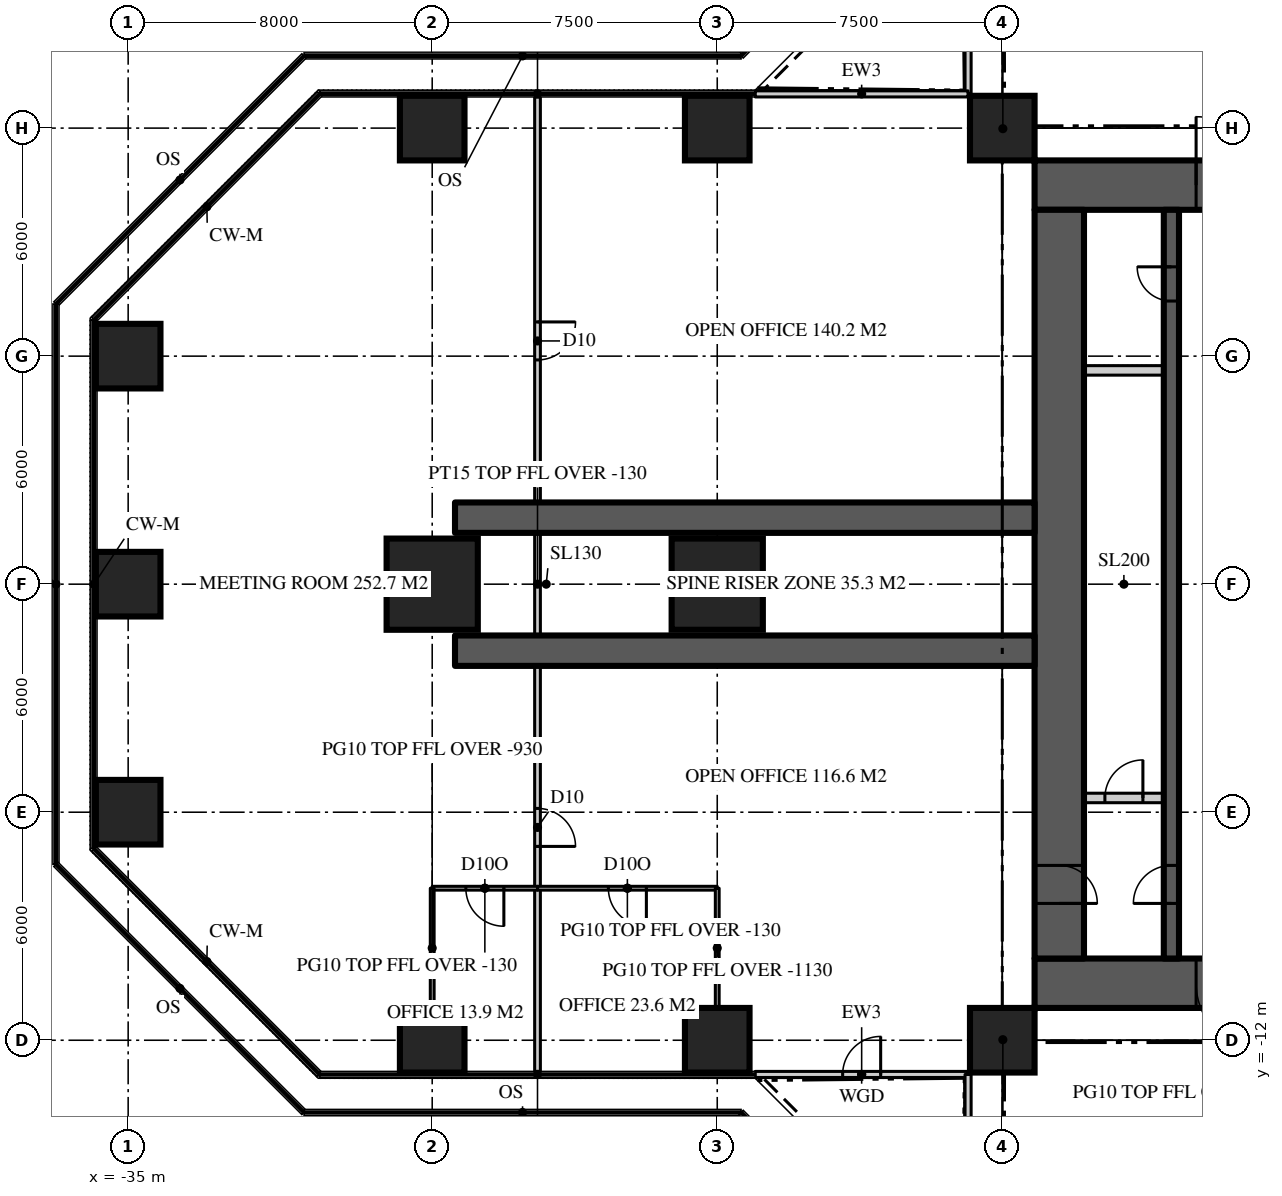
"""IFC4 building model, lengths in metres.
Left out: names, types, materials, properties, quantities, classifications, styles, units other than length and angle.
Written with IfcOpenShell. Run it as: python <this file> out.ifc"""

import sys

from ifc_helpers import new_model, si_unit, direction, frame, frame_2d, origin, origin_2d, place, context, subcontext, project, spatial, rectangle, extrude, element, fill, save


model = new_model("IFC4")
c1 = context("Model", 3, precision=1e-05, world=origin(), true_north=direction((0.0, 1.0)))
c2 = subcontext(c1, "Body", "Model", "MODEL_VIEW")
j1 = project(units=[si_unit("LENGTHUNIT", "METRE"), si_unit("PLANEANGLEUNIT", "RADIAN")], contexts=[c1])
p1 = place(None, origin())
s1 = spatial("IfcSite", under=j1, at=p1, CompositionType="ELEMENT")
p2 = place(p1, origin())
s2 = spatial("IfcBuilding", under=s1, at=p2, CompositionType="ELEMENT")
p3 = place(p2, frame((0.0, 0.0, 182.7)))
s3 = spatial("IfcBuildingStorey", under=s2, at=p3, CompositionType="ELEMENT", Elevation=182.7)
p4 = place(p3, frame((-11.15, 10.5, 0.0), z_axis=(0.0, 0.0, 1.0), x_axis=(1.0, 0.0, 0.0)))
e1 = element("IfcWall", 1, at=p4, inside=s3, PredefinedType="SHEAR", context=c2, shape_type="SweptSolid", body=[
    extrude(rectangle(XDim=22.3, YDim=1.3, at=frame_2d((11.15, 0.0))), origin(), (0.0, 0.0, 1.0), 3.9),
])
p5 = place(p4, frame((4.25, 0.0, 0.0)))
e2 = element("IfcOpeningElement", 2, at=p5, cuts=e1, PredefinedType="OPENING", context=c2, shape_type="SweptSolid", body=[
    extrude(rectangle(XDim=1.8, YDim=2.2, at=frame_2d((0.9, 1.1))), frame((0.0, 0.66, 0.0), z_axis=(0.0, -1.0, 0.0), x_axis=(1.0, 0.0, 0.0)), (0.0, 0.0, 1.0), 1.32),
])
p6 = place(p4, frame((16.25, 0.0, 0.0)))
e3 = element("IfcOpeningElement", 3, at=p6, cuts=e1, PredefinedType="OPENING", context=c2, shape_type="SweptSolid", body=[
    extrude(rectangle(XDim=1.8, YDim=2.2, at=frame_2d((0.9, 1.1))), frame((0.0, 0.66, 0.0), z_axis=(0.0, -1.0, 0.0), x_axis=(1.0, 0.0, 0.0)), (0.0, 0.0, 1.0), 1.32),
])
p7 = place(p3, frame((11.15, -10.5, 0.0), z_axis=(0.0, 0.0, 1.0), x_axis=(-1.0, 0.0, 0.0)))
e4 = element("IfcWall", 4, at=p7, inside=s3, PredefinedType="SHEAR", context=c2, shape_type="SweptSolid", body=[
    extrude(rectangle(XDim=22.3, YDim=1.3, at=frame_2d((11.15, 0.0))), origin(), (0.0, 0.0, 1.0), 3.9),
])
p8 = place(p7, frame((16.25, 0.0, 0.0)))
e5 = element("IfcOpeningElement", 5, at=p8, cuts=e4, PredefinedType="OPENING", context=c2, shape_type="SweptSolid", body=[
    extrude(rectangle(XDim=1.8, YDim=2.2, at=frame_2d((0.9, 1.1))), frame((0.0, 0.66, 0.0), z_axis=(0.0, -1.0, 0.0), x_axis=(1.0, 0.0, 0.0)), (0.0, 0.0, 1.0), 1.32),
])
p9 = place(p7, frame((4.25, 0.0, 0.0)))
e6 = element("IfcOpeningElement", 6, at=p9, cuts=e4, PredefinedType="OPENING", context=c2, shape_type="SweptSolid", body=[
    extrude(rectangle(XDim=1.8, YDim=2.2, at=frame_2d((0.9, 1.1))), frame((0.0, 0.66, 0.0), z_axis=(0.0, -1.0, 0.0), x_axis=(1.0, 0.0, 0.0)), (0.0, 0.0, 1.0), 1.32),
])
p10 = place(p3, frame((-10.5, 9.85, 0.0), z_axis=(0.0, 0.0, 1.0), x_axis=(0.0, -1.0, 0.0)))
e7 = element("IfcWall", 7, at=p10, inside=s3, PredefinedType="SHEAR", context=c2, shape_type="SweptSolid", body=[
    extrude(rectangle(XDim=19.7, YDim=1.3, at=frame_2d((9.85, 0.0))), origin(), (0.0, 0.0, 1.0), 3.9),
])
p11 = place(p10, frame((17.25, 0.0, 0.0)))
e8 = element("IfcOpeningElement", 8, at=p11, cuts=e7, PredefinedType="OPENING", context=c2, shape_type="SweptSolid", body=[
    extrude(rectangle(XDim=1.0, YDim=2.2, at=frame_2d((0.5, 1.1))), frame((0.0, 0.66, 0.0), z_axis=(0.0, -1.0, 0.0), x_axis=(1.0, 0.0, 0.0)), (0.0, 0.0, 1.0), 1.32),
])
for number, where, z_axis, x_axis in (
    (9, (-11.15, 1.75, 0.0), (0.0, 0.0, 1.0), (-1.0, 0.0, 0.0)),
    (10, (-11.15, -1.75, 0.0), (0.0, 0.0, 1.0), (-1.0, 0.0, 0.0)),
):
    element("IfcWall", number, at=place(p3, frame(where, z_axis=z_axis, x_axis=x_axis)), inside=s3, PredefinedType="SHEAR", context=c2, shape_type="SweptSolid", body=[
        extrude(rectangle(XDim=15.25, YDim=0.8, at=frame_2d((7.625, 0.0))), origin(), (0.0, 0.0, 1.0), 3.9),
    ])
for number, where, z_axis, x_axis in (
    (11, (-27.0, -12.0, 0.0), (0.0, 0.0, 1.0), (1.0, 0.0, 0.0)),
    (12, (-19.5, -12.0, 0.0), (0.0, 0.0, 1.0), (1.0, 0.0, 0.0)),
    (13, (-12.0, -12.0, 0.0), (0.0, 0.0, 1.0), (1.0, 0.0, 0.0)),
    (14, (-35.0, -6.0, 0.0), (0.0, 0.0, 1.0), (1.0, 0.0, 0.0)),
    (15, (-35.0, 0.0, 0.0), (0.0, 0.0, 1.0), (1.0, 0.0, 0.0)),
):
    element("IfcColumn", number, at=place(p3, frame(where, z_axis=z_axis, x_axis=x_axis)), inside=s3, PredefinedType="COLUMN", context=c2, shape_type="SweptSolid", body=[
        extrude(rectangle(XDim=1.7, YDim=1.7, at=origin_2d()), origin(), (0.0, 0.0, 1.0), 3.9),
    ])
for number, where, z_axis, x_axis in (
    (16, (-27.0, 0.0, 0.0), (0.0, 0.0, 1.0), (1.0, 0.0, 0.0)),
    (17, (-19.5, 0.0, 0.0), (0.0, 0.0, 1.0), (1.0, 0.0, 0.0)),
):
    element("IfcColumn", number, at=place(p3, frame(where, z_axis=z_axis, x_axis=x_axis)), inside=s3, PredefinedType="COLUMN", context=c2, shape_type="SweptSolid", body=[
        extrude(rectangle(XDim=2.4, YDim=2.4, at=origin_2d()), origin(), (0.0, 0.0, 1.0), 3.9),
    ])
for number, where, z_axis, x_axis in (
    (18, (-35.0, 6.0, 0.0), (0.0, 0.0, 1.0), (1.0, 0.0, 0.0)),
    (19, (-27.0, 12.0, 0.0), (0.0, 0.0, 1.0), (1.0, 0.0, 0.0)),
    (20, (-19.5, 12.0, 0.0), (0.0, 0.0, 1.0), (1.0, 0.0, 0.0)),
    (21, (-12.0, 12.0, 0.0), (0.0, 0.0, 1.0), (1.0, 0.0, 0.0)),
):
    element("IfcColumn", number, at=place(p3, frame(where, z_axis=z_axis, x_axis=x_axis)), inside=s3, PredefinedType="COLUMN", context=c2, shape_type="SweptSolid", body=[
        extrude(rectangle(XDim=1.7, YDim=1.7, at=origin_2d()), origin(), (0.0, 0.0, 1.0), 3.9),
    ])
p12 = place(p3, frame((-12.9, 18.5, 0.0), z_axis=(0.0, 0.0, 1.0), x_axis=(0.0, -1.0, 0.0)))
e22 = element("IfcWall", 22, at=p12, inside=s3, PredefinedType="SOLIDWALL", context=c2, shape_type="SweptSolid", body=[
    extrude(rectangle(XDim=5.6, YDim=0.16, at=frame_2d((2.8, 0.0))), origin(), (0.0, 0.0, 1.0), 3.77),
])
p13 = place(p12, frame((2.3, 0.0, 0.0)))
e23 = element("IfcOpeningElement", 23, at=p13, cuts=e22, PredefinedType="OPENING", context=c2, shape_type="SweptSolid", body=[
    extrude(rectangle(XDim=1.0, YDim=2.2, at=frame_2d((0.5, 1.1))), frame((0.0, 0.09, 0.0), z_axis=(0.0, -1.0, 0.0), x_axis=(1.0, 0.0, 0.0)), (0.0, 0.0, 1.0), 0.18),
])
p14 = place(p3, frame((-12.9, 12.9, 0.0), z_axis=(0.0, 0.0, 1.0), x_axis=(-1.0, 0.0, 0.0)))
e24 = element("IfcWall", 24, at=p14, inside=s3, PredefinedType="SOLIDWALL", context=c2, shape_type="SweptSolid", body=[
    extrude(rectangle(XDim=5.6, YDim=0.16, at=frame_2d((2.8, 0.0))), origin(), (0.0, 0.0, 1.0), 3.77),
])
p15 = place(p3, frame((-18.5, -12.9, 0.0), z_axis=(0.0, 0.0, 1.0), x_axis=(1.0, 0.0, 0.0)))
e25 = element("IfcWall", 25, at=p15, inside=s3, PredefinedType="SOLIDWALL", context=c2, shape_type="SweptSolid", body=[
    extrude(rectangle(XDim=5.6, YDim=0.16, at=frame_2d((2.8, 0.0))), origin(), (0.0, 0.0, 1.0), 3.77),
])
p16 = place(p15, frame((2.3, 0.0, 0.0)))
e26 = element("IfcOpeningElement", 26, at=p16, cuts=e25, PredefinedType="OPENING", context=c2, shape_type="SweptSolid", body=[
    extrude(rectangle(XDim=1.0, YDim=2.2, at=frame_2d((0.5, 1.1))), frame((0.0, 0.09, 0.0), z_axis=(0.0, -1.0, 0.0), x_axis=(1.0, 0.0, 0.0)), (0.0, 0.0, 1.0), 0.18),
])
p17 = place(p3, frame((-12.9, -12.9, 0.0), z_axis=(0.0, 0.0, 1.0), x_axis=(0.0, -1.0, 0.0)))
e27 = element("IfcWall", 27, at=p17, inside=s3, PredefinedType="SOLIDWALL", context=c2, shape_type="SweptSolid", body=[
    extrude(rectangle(XDim=5.6, YDim=0.16, at=frame_2d((2.8, 0.0))), origin(), (0.0, 0.0, 1.0), 3.77),
])
p18 = place(p3, frame((-7.55, -9.85, 0.0), z_axis=(0.0, 0.0, 1.0), x_axis=(0.0, 1.0, 0.0)))
e28 = element("IfcWall", 28, at=p18, inside=s3, PredefinedType="SHEAR", context=c2, shape_type="SweptSolid", body=[
    extrude(rectangle(XDim=19.7, YDim=0.4, at=frame_2d((9.85, 0.0))), origin(), (0.0, 0.0, 1.0), 3.9),
])
p19 = place(p18, frame((1.45, 0.0, 0.0)))
e29 = element("IfcOpeningElement", 29, at=p19, cuts=e28, PredefinedType="OPENING", context=c2, shape_type="SweptSolid", body=[
    extrude(rectangle(XDim=1.0, YDim=2.2, at=frame_2d((0.5, 1.1))), frame((0.0, 0.21, 0.0), z_axis=(0.0, -1.0, 0.0), x_axis=(1.0, 0.0, 0.0)), (0.0, 0.0, 1.0), 0.42),
])
p20 = place(p18, frame((17.3, 0.0, 0.0)))
e30 = element("IfcOpeningElement", 30, at=p20, cuts=e28, PredefinedType="OPENING", context=c2, shape_type="SweptSolid", body=[
    extrude(rectangle(XDim=0.9, YDim=2.1, at=frame_2d((0.45, 1.05))), frame((0.0, 0.21, 0.0), z_axis=(0.0, -1.0, 0.0), x_axis=(1.0, 0.0, 0.0)), (0.0, 0.0, 1.0), 0.42),
])
p21 = place(p3, frame((-9.85, 5.625, 0.0), z_axis=(0.0, 0.0, 1.0), x_axis=(1.0, 0.0, 0.0)))
e31 = element("IfcWall", 31, at=p21, inside=s3, PredefinedType="SOLIDWALL", context=c2, shape_type="SweptSolid", body=[
    extrude(rectangle(XDim=2.1, YDim=0.25, at=frame_2d((1.05, 0.0))), origin(), (0.0, 0.0, 1.0), 3.7),
])
p22 = place(p3, frame((-9.85, -5.625, 0.0), z_axis=(0.0, 0.0, 1.0), x_axis=(1.0, 0.0, 0.0)))
e32 = element("IfcWall", 32, at=p22, inside=s3, PredefinedType="SOLIDWALL", context=c2, shape_type="SweptSolid", body=[
    extrude(rectangle(XDim=2.1, YDim=0.25, at=frame_2d((1.05, 0.0))), origin(), (0.0, 0.0, 1.0), 3.7),
])
p23 = place(p22, frame((0.55, 0.0, 0.0)))
e33 = element("IfcOpeningElement", 33, at=p23, cuts=e32, PredefinedType="OPENING", context=c2, shape_type="SweptSolid", body=[
    extrude(rectangle(XDim=1.0, YDim=2.2, at=frame_2d((0.5, 1.1))), frame((0.0, 0.135, 0.0), z_axis=(0.0, -1.0, 0.0), x_axis=(1.0, 0.0, 0.0)), (0.0, 0.0, 1.0), 0.27),
])
p24 = place(p3, frame((-24.229, 12.82, 0.0), z_axis=(0.0, 0.0, 1.0), x_axis=(0.0, -1.0, 0.0)))
e34 = element("IfcWall", 34, at=p24, inside=s3, PredefinedType="PARTITIONING", context=c2, shape_type="SweptSolid", body=[
    extrude(rectangle(XDim=25.64, YDim=0.15, at=frame_2d((12.82, 0.0))), origin(), (0.0, 0.0, 1.0), 3.77),
])
p25 = place(p24, frame((18.72, 0.0, 0.0)))
e35 = element("IfcOpeningElement", 35, at=p25, cuts=e34, PredefinedType="OPENING", context=c2, shape_type="SweptSolid", body=[
    extrude(rectangle(XDim=1.0, YDim=2.2, at=frame_2d((0.5, 1.1))), frame((0.0, 0.085, 0.0), z_axis=(0.0, -1.0, 0.0), x_axis=(1.0, 0.0, 0.0)), (0.0, 0.0, 1.0), 0.17),
])
p26 = place(p24, frame((5.92, 0.0, 0.0)))
e36 = element("IfcOpeningElement", 36, at=p26, cuts=e34, PredefinedType="OPENING", context=c2, shape_type="SweptSolid", body=[
    extrude(rectangle(XDim=1.0, YDim=2.2, at=frame_2d((0.5, 1.1))), frame((0.0, 0.085, 0.0), z_axis=(0.0, -1.0, 0.0), x_axis=(1.0, 0.0, 0.0)), (0.0, 0.0, 1.0), 0.17),
])
p27 = place(p3, frame((-19.5, -8.0, 0.0), z_axis=(0.0, 0.0, 1.0), x_axis=(-1.0, 0.0, 0.0)))
e37 = element("IfcWall", 37, at=p27, inside=s3, PredefinedType="PARTITIONING", context=c2, shape_type="SweptSolid", body=[
    extrude(rectangle(XDim=4.729, YDim=0.1, at=frame_2d((2.365, 0.0))), origin(), (0.0, 0.0, 1.0), 3.77),
])
p28 = place(p27, frame((1.865, 0.0, 0.0)))
e38 = element("IfcOpeningElement", 38, at=p28, cuts=e37, PredefinedType="OPENING", context=c2, shape_type="SweptSolid", body=[
    extrude(rectangle(XDim=1.0, YDim=2.2, at=frame_2d((0.5, 1.1))), frame((0.0, 0.06, 0.0), z_axis=(0.0, -1.0, 0.0), x_axis=(1.0, 0.0, 0.0)), (0.0, 0.0, 1.0), 0.12),
])
p29 = place(p3, frame((-24.229, -8.0, 0.0), z_axis=(0.0, 0.0, 1.0), x_axis=(-1.0, 0.0, 0.0)))
e39 = element("IfcWall", 39, at=p29, inside=s3, PredefinedType="PARTITIONING", context=c2, shape_type="SweptSolid", body=[
    extrude(rectangle(XDim=2.771, YDim=0.1, at=frame_2d((1.385, 0.0))), origin(), (0.0, 0.0, 1.0), 3.77),
])
p30 = place(p29, frame((0.885, 0.0, 0.0)))
e40 = element("IfcOpeningElement", 40, at=p30, cuts=e39, PredefinedType="OPENING", context=c2, shape_type="SweptSolid", body=[
    extrude(rectangle(XDim=1.0, YDim=2.2, at=frame_2d((0.5, 1.1))), frame((0.0, 0.06, 0.0), z_axis=(0.0, -1.0, 0.0), x_axis=(1.0, 0.0, 0.0)), (0.0, 0.0, 1.0), 0.12),
])
p31 = place(p3, frame((-19.5, -8.0, 0.0), z_axis=(0.0, 0.0, 1.0), x_axis=(0.0, -1.0, 0.0)))
e41 = element("IfcWall", 41, at=p31, inside=s3, PredefinedType="PARTITIONING", context=c2, shape_type="SweptSolid", body=[
    extrude(rectangle(XDim=3.15, YDim=0.1, at=frame_2d((1.575, 0.0))), origin(), (0.0, 0.0, 1.0), 2.77),
])
p32 = place(p3, frame((-27.0, -8.0, 0.0), z_axis=(0.0, 0.0, 1.0), x_axis=(0.0, -1.0, 0.0)))
e42 = element("IfcWall", 42, at=p32, inside=s3, PredefinedType="PARTITIONING", context=c2, shape_type="SweptSolid", body=[
    extrude(rectangle(XDim=3.15, YDim=0.1, at=frame_2d((1.575, 0.0))), origin(), (0.0, 0.0, 1.0), 2.97),
])
for number, where, z_axis, x_axis in (
    (43, (-11.15, 11.15, 0.0), (0.0, 0.0, 1.0), (-0.707, 0.707, 0.0)),
    (44, (-11.15, -11.15, 0.0), (0.0, 0.0, 1.0), (-0.707, -0.707, 0.0)),
):
    element("IfcWall", number, at=place(p3, frame(where, z_axis=z_axis, x_axis=x_axis)), inside=s3, PredefinedType="PARTITIONING", context=c2, shape_type="SweptSolid", body=[
        extrude(rectangle(XDim=2.362, YDim=0.15, at=frame_2d((1.181, 0.0))), origin(), (0.0, 0.0, 1.0), 3.22),
    ])
p33 = place(p16, origin())
e45 = element("IfcDoor", 45, at=p33, inside=s3, OperationType="SINGLE_SWING_RIGHT", PredefinedType="DOOR", context=c2, shape_type="SweptSolid", body=[
    extrude(rectangle(XDim=1.0, YDim=2.2, at=frame_2d((0.5, 1.1))), frame((0.0, 0.025, 0.0), z_axis=(0.0, -1.0, 0.0), x_axis=(1.0, 0.0, 0.0)), (0.0, 0.0, 1.0), 0.05),
])
fill(e26, e45)
p34 = place(p5, origin())
e46 = element("IfcDoor", 46, at=p34, inside=s3, OperationType="DOUBLE_DOOR_DOUBLE_SWING", PredefinedType="DOOR", context=c2, shape_type="SweptSolid", body=[
    extrude(rectangle(XDim=1.8, YDim=2.2, at=frame_2d((0.9, 1.1))), frame((0.0, 0.025, 0.0), z_axis=(0.0, -1.0, 0.0), x_axis=(1.0, 0.0, 0.0)), (0.0, 0.0, 1.0), 0.05),
])
fill(e2, e46)
p35 = place(p8, origin())
e47 = element("IfcDoor", 47, at=p35, inside=s3, OperationType="DOUBLE_DOOR_DOUBLE_SWING", PredefinedType="DOOR", context=c2, shape_type="SweptSolid", body=[
    extrude(rectangle(XDim=1.8, YDim=2.2, at=frame_2d((0.9, 1.1))), frame((0.0, 0.025, 0.0), z_axis=(0.0, -1.0, 0.0), x_axis=(1.0, 0.0, 0.0)), (0.0, 0.0, 1.0), 0.05),
])
fill(e5, e47)
p36 = place(p19, origin())
e48 = element("IfcDoor", 48, at=p36, inside=s3, OperationType="SINGLE_SWING_LEFT", PredefinedType="DOOR", context=c2, shape_type="SweptSolid", body=[
    extrude(rectangle(XDim=1.0, YDim=2.2, at=frame_2d((0.5, 1.1))), frame((0.0, 0.025, 0.0), z_axis=(0.0, -1.0, 0.0), x_axis=(1.0, 0.0, 0.0)), (0.0, 0.0, 1.0), 0.05),
])
fill(e29, e48)
p37 = place(p11, origin())
e49 = element("IfcDoor", 49, at=p37, inside=s3, OperationType="SINGLE_SWING_RIGHT", PredefinedType="DOOR", context=c2, shape_type="SweptSolid", body=[
    extrude(rectangle(XDim=1.0, YDim=2.2, at=frame_2d((0.5, 1.1))), frame((0.0, 0.025, 0.0), z_axis=(0.0, -1.0, 0.0), x_axis=(1.0, 0.0, 0.0)), (0.0, 0.0, 1.0), 0.05),
])
fill(e8, e49)
p38 = place(p20, origin())
e50 = element("IfcDoor", 50, at=p38, inside=s3, OperationType="SINGLE_SWING_RIGHT", PredefinedType="DOOR", context=c2, shape_type="SweptSolid", body=[
    extrude(rectangle(XDim=0.9, YDim=2.1, at=frame_2d((0.45, 1.05))), frame((0.0, 0.025, 0.0), z_axis=(0.0, -1.0, 0.0), x_axis=(1.0, 0.0, 0.0)), (0.0, 0.0, 1.0), 0.05),
])
fill(e30, e50)
p39 = place(p25, origin())
e51 = element("IfcDoor", 51, at=p39, inside=s3, OperationType="SINGLE_SWING_RIGHT", PredefinedType="DOOR", context=c2, shape_type="SweptSolid", body=[
    extrude(rectangle(XDim=1.0, YDim=2.2, at=frame_2d((0.5, 1.1))), frame((0.0, 0.025, 0.0), z_axis=(0.0, -1.0, 0.0), x_axis=(1.0, 0.0, 0.0)), (0.0, 0.0, 1.0), 0.05),
])
fill(e35, e51)
p40 = place(p26, origin())
e52 = element("IfcDoor", 52, at=p40, inside=s3, OperationType="SINGLE_SWING_LEFT", PredefinedType="DOOR", context=c2, shape_type="SweptSolid", body=[
    extrude(rectangle(XDim=1.0, YDim=2.2, at=frame_2d((0.5, 1.1))), frame((0.0, 0.025, 0.0), z_axis=(0.0, -1.0, 0.0), x_axis=(1.0, 0.0, 0.0)), (0.0, 0.0, 1.0), 0.05),
])
fill(e36, e52)
p41 = place(p28, origin())
e53 = element("IfcDoor", 53, at=p41, inside=s3, OperationType="SINGLE_SWING_LEFT", PredefinedType="DOOR", context=c2, shape_type="SweptSolid", body=[
    extrude(rectangle(XDim=1.0, YDim=2.2, at=frame_2d((0.5, 1.1))), frame((0.0, 0.025, 0.0), z_axis=(0.0, -1.0, 0.0), x_axis=(1.0, 0.0, 0.0)), (0.0, 0.0, 1.0), 0.05),
])
fill(e38, e53)
p42 = place(p30, origin())
e54 = element("IfcDoor", 54, at=p42, inside=s3, OperationType="SINGLE_SWING_LEFT", PredefinedType="DOOR", context=c2, shape_type="SweptSolid", body=[
    extrude(rectangle(XDim=1.0, YDim=2.2, at=frame_2d((0.5, 1.1))), frame((0.0, 0.025, 0.0), z_axis=(0.0, -1.0, 0.0), x_axis=(1.0, 0.0, 0.0)), (0.0, 0.0, 1.0), 0.05),
])
fill(e40, e54)
p43 = place(p23, origin())
e55 = element("IfcDoor", 55, at=p43, inside=s3, OperationType="SINGLE_SWING_RIGHT", PredefinedType="DOOR", context=c2, shape_type="SweptSolid", body=[
    extrude(rectangle(XDim=1.0, YDim=2.2, at=frame_2d((0.5, 1.1))), frame((0.0, 0.025, 0.0), z_axis=(0.0, -1.0, 0.0), x_axis=(1.0, 0.0, 0.0)), (0.0, 0.0, 1.0), 0.05),
])
fill(e33, e55)
save(model, sys.argv[1])
